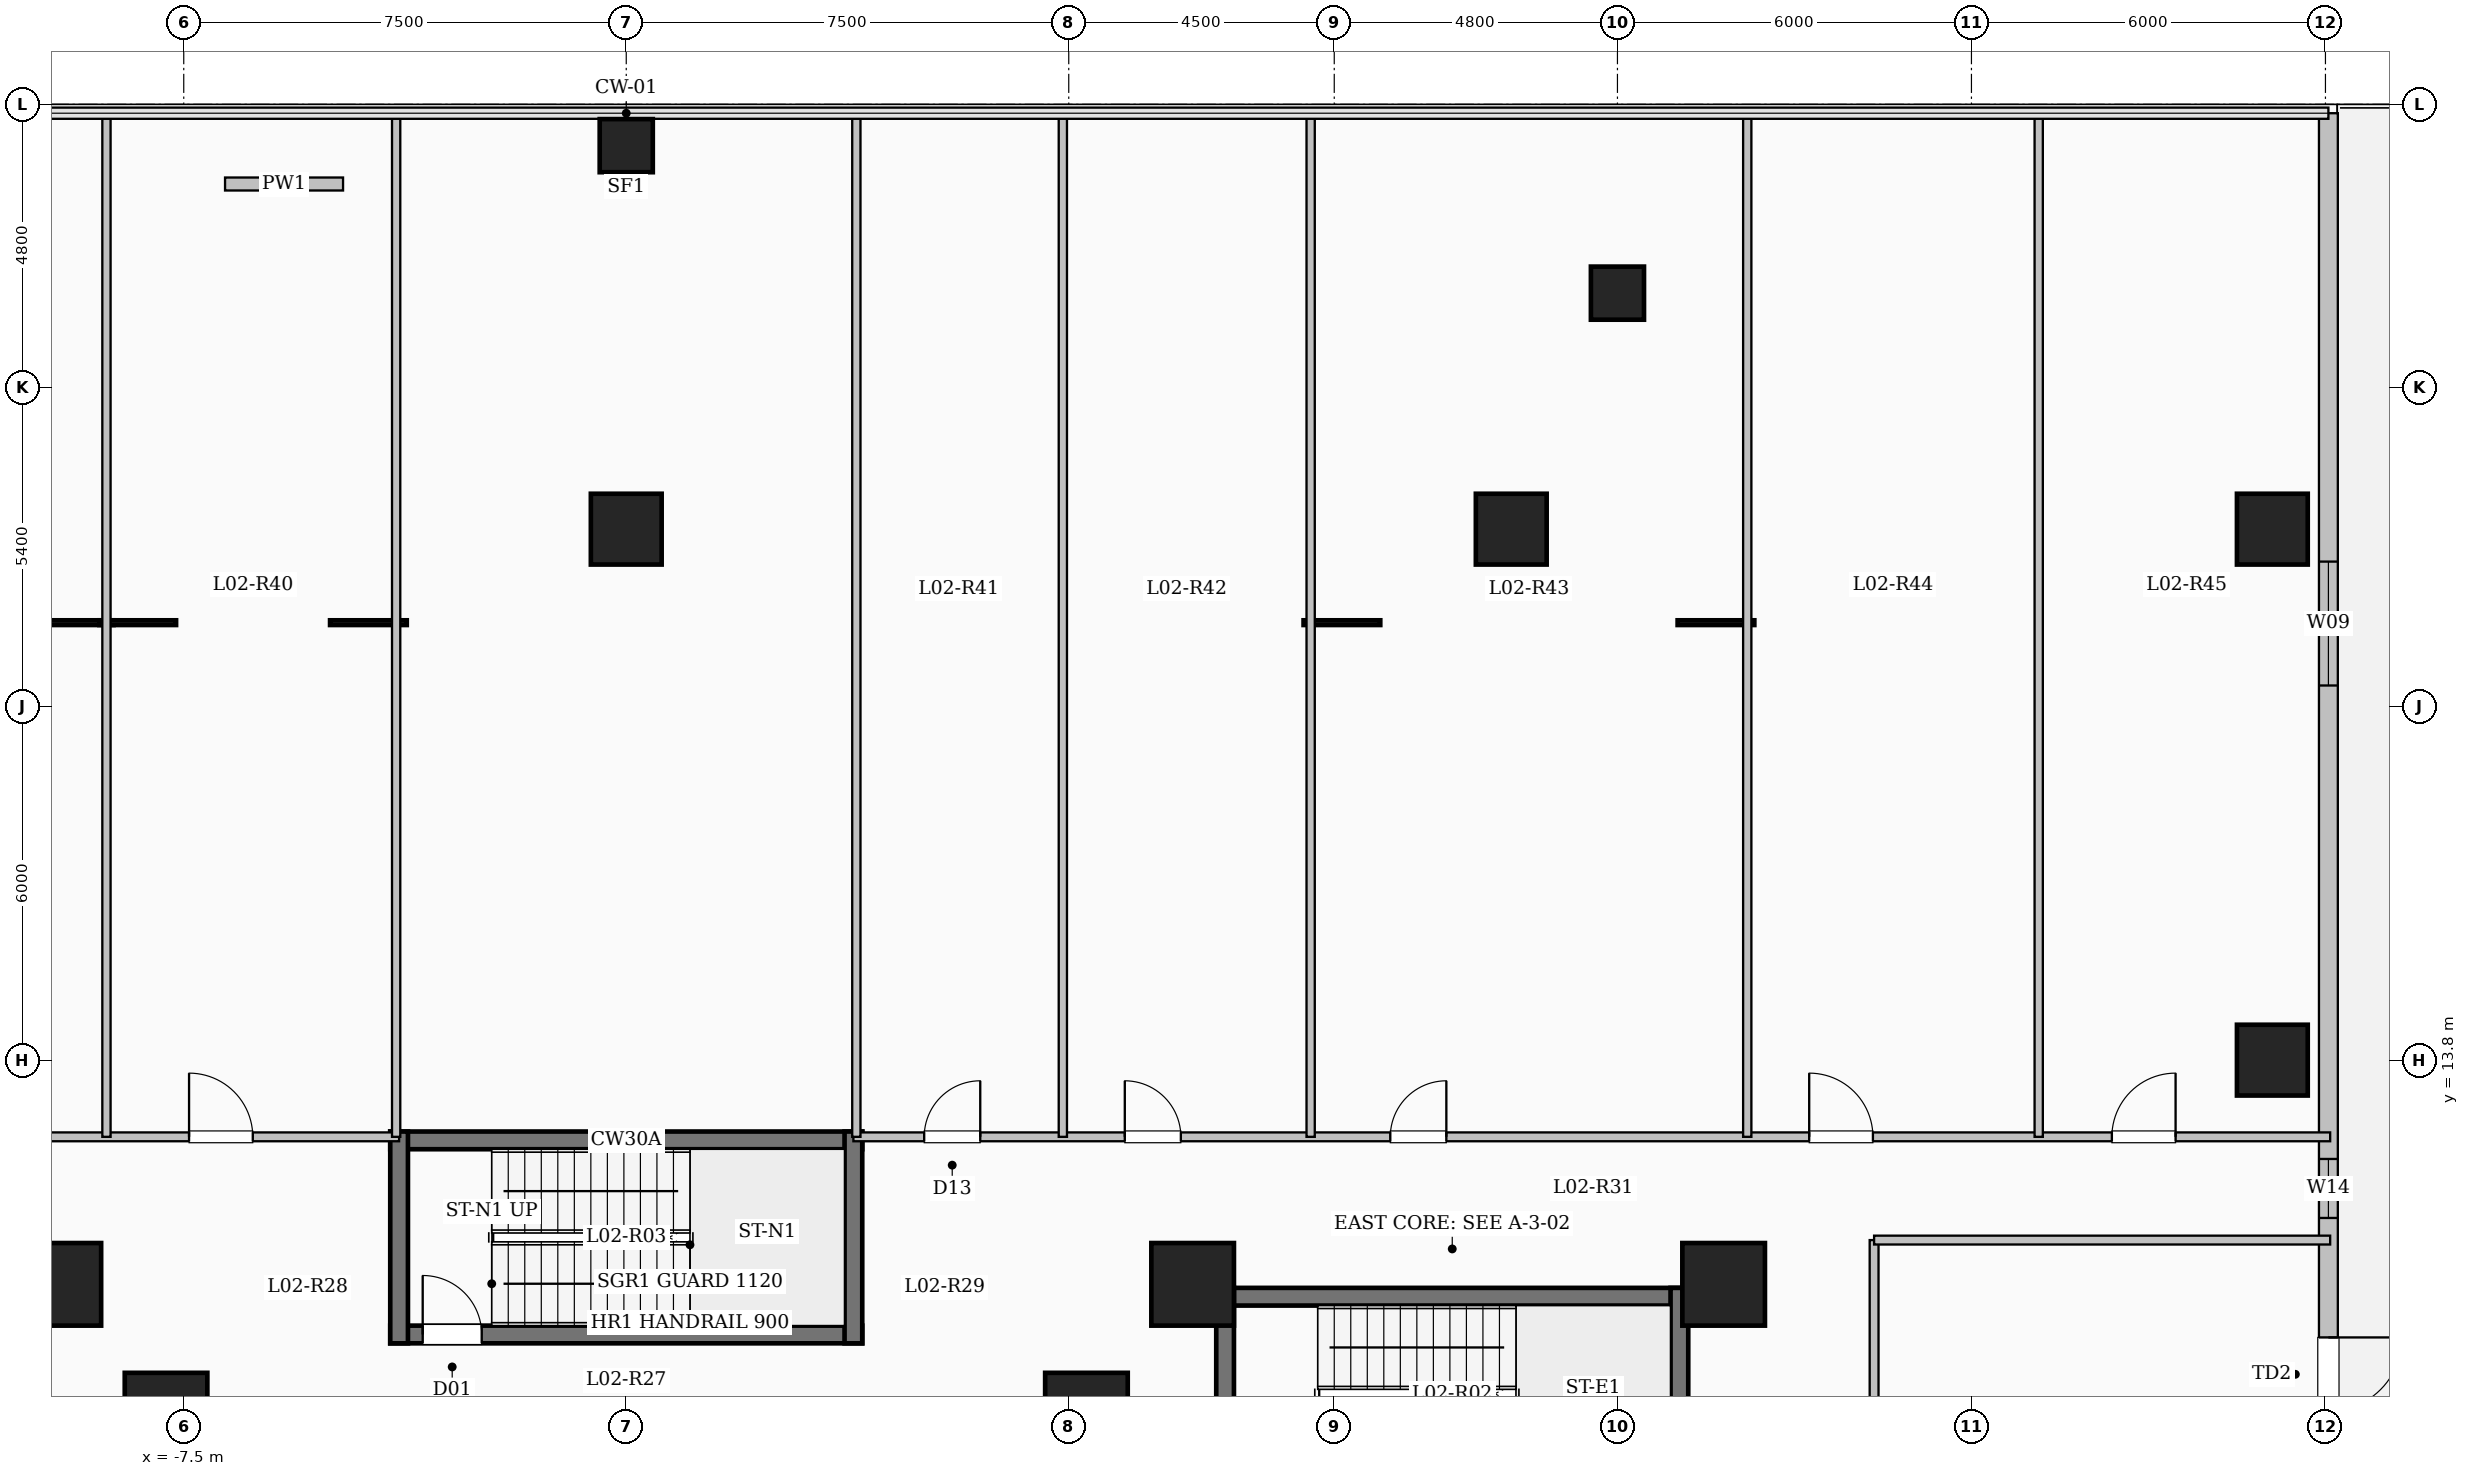
"""IFC4 building model, lengths in metres.
Left out: names, types, materials, properties, quantities, classifications, styles, units other than length and angle.
Written with IfcOpenShell. Run it as: python <this file> out.ifc"""

import sys

from ifc_helpers import new_model, si_unit, direction, frame, frame_2d, origin, origin_2d, place, context, subcontext, project, spatial, rectangle, extrude, element, fill, save


model = new_model("IFC4")
c1 = context("Model", 3, precision=1e-05, world=origin(), true_north=direction((0.0, 1.0)))
c2 = subcontext(c1, "Body", "Model", "MODEL_VIEW")
j1 = project(units=[si_unit("LENGTHUNIT", "METRE"), si_unit("PLANEANGLEUNIT", "RADIAN")], contexts=[c1])
p1 = place(None, origin())
s1 = spatial("IfcSite", under=j1, at=p1, CompositionType="ELEMENT")
p2 = place(p1, origin())
s2 = spatial("IfcBuilding", under=s1, at=p2, CompositionType="ELEMENT")
p3 = place(p2, frame((0.0, 0.0, 9.9)))
s3 = spatial("IfcBuildingStorey", under=s2, at=p3, CompositionType="ELEMENT", Elevation=9.9)
for number, where, z_axis, x_axis in (
    (1, (-7.8, 7.8, 0.0), (0.0, 0.0, 1.0), (1.0, 0.0, 0.0)),
    (2, (7.8, 7.8, 0.0), (0.0, 0.0, 1.0), (1.0, 0.0, 0.0)),
    (3, (-9.6, 10.0, 0.0), (0.0, 0.0, 1.0), (1.0, 0.0, 0.0)),
    (4, (9.6, 10.0, 0.0), (0.0, 0.0, 1.0), (1.0, 0.0, 0.0)),
    (5, (18.6, 10.0, 0.0), (0.0, 0.0, 1.0), (1.0, 0.0, 0.0)),
):
    element("IfcColumn", number, at=place(p3, frame(where, z_axis=z_axis, x_axis=x_axis)), inside=s3, PredefinedType="COLUMN", context=c2, shape_type="SweptSolid", body=[
        extrude(rectangle(XDim=1.4, YDim=1.4, at=origin_2d()), origin(), (0.0, 0.0, 1.0), 4.5),
    ])
for number, where, z_axis, x_axis in (
    (6, (0.0, 29.3, 0.0), (0.0, 0.0, 1.0), (1.0, 0.0, 0.0)),
    (7, (16.8, 26.8, 0.0), (0.0, 0.0, 1.0), (1.0, 0.0, 0.0)),
):
    element("IfcColumn", number, at=place(p3, frame(where, z_axis=z_axis, x_axis=x_axis)), inside=s3, PredefinedType="COLUMN", context=c2, shape_type="SweptSolid", body=[
        extrude(rectangle(XDim=0.9, YDim=0.9, at=origin_2d()), origin(), (0.0, 0.0, 1.0), 4.5),
    ])
for number, where, z_axis, x_axis in (
    (8, (0.0, 22.8, 0.0), (0.0, 0.0, 1.0), (1.0, 0.0, 0.0)),
    (9, (15.0, 22.8, 0.0), (0.0, 0.0, 1.0), (1.0, 0.0, 0.0)),
    (10, (27.9, 22.8, 0.0), (0.0, 0.0, 1.0), (1.0, 0.0, 0.0)),
    (11, (27.9, 13.8, 0.0), (0.0, 0.0, 1.0), (1.0, 0.0, 0.0)),
):
    element("IfcColumn", number, at=place(p3, frame(where, z_axis=z_axis, x_axis=x_axis)), inside=s3, PredefinedType="COLUMN", context=c2, shape_type="SweptSolid", body=[
        extrude(rectangle(XDim=1.2, YDim=1.2, at=origin_2d()), origin(), (0.0, 0.0, 1.0), 4.5),
    ])
p4 = place(p3, frame((28.85, 29.85, 0.0), z_axis=(0.0, 0.0, 1.0), x_axis=(0.0, -1.0, 0.0)))
e12 = element("IfcWall", 12, at=p4, inside=s3, PredefinedType="SOLIDWALL", context=c2, shape_type="SweptSolid", body=[
    extrude(rectangle(XDim=59.7, YDim=0.32, at=frame_2d((29.85, 0.0))), origin(), (0.0, 0.0, 1.0), 4.2),
])
p5 = place(p4, frame((20.75, 0.0, 0.0)))
e13 = element("IfcOpeningElement", 13, at=p5, cuts=e12, PredefinedType="OPENING", context=c2, shape_type="SweptSolid", body=[
    extrude(rectangle(XDim=1.25, YDim=2.25, at=frame_2d((0.625, 1.125))), frame((0.0, 0.17, 0.0), z_axis=(0.0, -1.0, 0.0), x_axis=(1.0, 0.0, 0.0)), (0.0, 0.0, 1.0), 0.34),
])
p6 = place(p4, frame((7.6, 0.0, 0.9)))
e14 = element("IfcOpeningElement", 14, at=p6, cuts=e12, PredefinedType="OPENING", context=c2, shape_type="SweptSolid", body=[
    extrude(rectangle(XDim=2.1, YDim=2.0, at=frame_2d((1.05, 1.0))), frame((0.0, 0.17, 0.0), z_axis=(0.0, -1.0, 0.0), x_axis=(1.0, 0.0, 0.0)), (0.0, 0.0, 1.0), 0.34),
])
p7 = place(p4, frame((17.725, 0.0, 0.95)))
e15 = element("IfcOpeningElement", 15, at=p7, cuts=e12, PredefinedType="OPENING", context=c2, shape_type="SweptSolid", body=[
    extrude(rectangle(XDim=1.0, YDim=1.5, at=frame_2d((0.5, 0.75))), frame((0.0, 0.17, 0.0), z_axis=(0.0, -1.0, 0.0), x_axis=(1.0, 0.0, 0.0)), (0.0, 0.0, 1.0), 0.34),
])
p8 = place(p4, frame((28.345, 0.0, 0.9)))
e16 = element("IfcOpeningElement", 16, at=p8, cuts=e12, PredefinedType="OPENING", context=c2, shape_type="SweptSolid", body=[
    extrude(rectangle(XDim=2.1, YDim=2.0, at=frame_2d((1.05, 1.0))), frame((0.0, 0.17, 0.0), z_axis=(0.0, -1.0, 0.0), x_axis=(1.0, 0.0, 0.0)), (0.0, 0.0, 1.0), 0.34),
])
p9 = place(p4, frame((37.758, 0.0, 0.9)))
e17 = element("IfcOpeningElement", 17, at=p9, cuts=e12, PredefinedType="OPENING", context=c2, shape_type="SweptSolid", body=[
    extrude(rectangle(XDim=1.7, YDim=1.9, at=frame_2d((0.85, 0.95))), frame((0.0, 0.17, 0.0), z_axis=(0.0, -1.0, 0.0), x_axis=(1.0, 0.0, 0.0)), (0.0, 0.0, 1.0), 0.34),
])
p10 = place(p3, frame((-6.8, 28.65, 0.0), z_axis=(0.0, 0.0, 1.0), x_axis=(1.0, 0.0, 0.0)))
e18 = element("IfcWall", 18, at=p10, inside=s3, PredefinedType="PARAPET", context=c2, shape_type="SweptSolid", body=[
    extrude(rectangle(XDim=2.0, YDim=0.22, at=frame_2d((1.0, 0.0))), origin(), (0.0, 0.0, 1.0), 0.85),
])
p11 = place(p3, frame((10.0, 9.79, 0.0), z_axis=(0.0, 0.0, 1.0), x_axis=(1.0, 0.0, 0.0)))
e19 = element("IfcWall", 19, at=p11, inside=s3, PredefinedType="SHEAR", context=c2, shape_type="SweptSolid", body=[
    extrude(rectangle(XDim=8.0, YDim=0.3, at=frame_2d((4.0, 0.0))), origin(), (0.0, 0.0, 1.0), 4.5),
])
for number, where, z_axis, x_axis in (
    (20, (10.15, 6.35, 0.0), (0.0, 0.0, 1.0), (0.0, 1.0, 0.0)),
    (21, (17.85, 6.35, 0.0), (0.0, 0.0, 1.0), (0.0, 1.0, 0.0)),
):
    element("IfcWall", number, at=place(p3, frame(where, z_axis=z_axis, x_axis=x_axis)), inside=s3, PredefinedType="SHEAR", context=c2, shape_type="SweptSolid", body=[
        extrude(rectangle(XDim=3.59, YDim=0.3, at=frame_2d((1.795, 0.0))), origin(), (0.0, 0.0, 1.0), 4.5),
    ])
p12 = place(p3, frame((-4.0, 12.44, 0.0), z_axis=(0.0, 0.0, 1.0), x_axis=(1.0, 0.0, 0.0)))
e22 = element("IfcWall", 22, at=p12, inside=s3, PredefinedType="SHEAR", context=c2, shape_type="SweptSolid", body=[
    extrude(rectangle(XDim=8.0, YDim=0.3, at=frame_2d((4.0, 0.0))), origin(), (0.0, 0.0, 1.0), 4.5),
])
p13 = place(p3, frame((-4.0, 9.15, 0.0), z_axis=(0.0, 0.0, 1.0), x_axis=(1.0, 0.0, 0.0)))
e23 = element("IfcWall", 23, at=p13, inside=s3, PredefinedType="SHEAR", context=c2, shape_type="SweptSolid", body=[
    extrude(rectangle(XDim=8.0, YDim=0.3, at=frame_2d((4.0, 0.0))), origin(), (0.0, 0.0, 1.0), 4.5),
])
p14 = place(p13, frame((0.55, 0.0, 0.0)))
e24 = element("IfcOpeningElement", 24, at=p14, cuts=e23, PredefinedType="OPENING", context=c2, shape_type="SweptSolid", body=[
    extrude(rectangle(XDim=1.0, YDim=2.15, at=frame_2d((0.5, 1.075))), frame((0.0, 0.16, 0.0), z_axis=(0.0, -1.0, 0.0), x_axis=(1.0, 0.0, 0.0)), (0.0, 0.0, 1.0), 0.32),
])
for number, where, z_axis, x_axis in (
    (25, (-3.85, 9.0, 0.0), (0.0, 0.0, 1.0), (0.0, 1.0, 0.0)),
    (26, (3.85, 9.0, 0.0), (0.0, 0.0, 1.0), (0.0, 1.0, 0.0)),
):
    element("IfcWall", number, at=place(p3, frame(where, z_axis=z_axis, x_axis=x_axis)), inside=s3, PredefinedType="SHEAR", context=c2, shape_type="SweptSolid", body=[
        extrude(rectangle(XDim=3.59, YDim=0.3, at=frame_2d((1.795, 0.0))), origin(), (0.0, 0.0, 1.0), 4.5),
    ])
p15 = place(p3, frame((-28.88, 12.5, 0.0), z_axis=(0.0, 0.0, 1.0), x_axis=(1.0, 0.0, 0.0)))
e27 = element("IfcWall", 27, at=p15, inside=s3, PredefinedType="PARTITIONING", context=c2, shape_type="SweptSolid", body=[
    extrude(rectangle(XDim=25.03, YDim=0.15, at=frame_2d((12.515, 0.0))), origin(), (0.0, 0.0, 1.0), 4.2),
])
p16 = place(p15, frame((2.5, 0.0, 0.0)))
e28 = element("IfcOpeningElement", 28, at=p16, cuts=e27, PredefinedType="OPENING", context=c2, shape_type="SweptSolid", body=[
    extrude(rectangle(XDim=1.2, YDim=2.15, at=frame_2d((0.6, 1.075))), frame((0.0, 0.085, 0.0), z_axis=(0.0, -1.0, 0.0), x_axis=(1.0, 0.0, 0.0)), (0.0, 0.0, 1.0), 0.17),
])
p17 = place(p15, frame((16.58, 0.0, 0.0)))
e29 = element("IfcOpeningElement", 29, at=p17, cuts=e27, PredefinedType="OPENING", context=c2, shape_type="SweptSolid", body=[
    extrude(rectangle(XDim=1.08, YDim=2.15, at=frame_2d((0.54, 1.075))), frame((0.0, 0.085, 0.0), z_axis=(0.0, -1.0, 0.0), x_axis=(1.0, 0.0, 0.0)), (0.0, 0.0, 1.0), 0.17),
])
p18 = place(p15, frame((21.47, 0.0, 0.0)))
e30 = element("IfcOpeningElement", 30, at=p18, cuts=e27, PredefinedType="OPENING", context=c2, shape_type="SweptSolid", body=[
    extrude(rectangle(XDim=1.08, YDim=2.15, at=frame_2d((0.54, 1.075))), frame((0.0, 0.085, 0.0), z_axis=(0.0, -1.0, 0.0), x_axis=(1.0, 0.0, 0.0)), (0.0, 0.0, 1.0), 0.17),
])
p19 = place(p3, frame((3.85, 12.5, 0.0), z_axis=(0.0, 0.0, 1.0), x_axis=(1.0, 0.0, 0.0)))
e31 = element("IfcWall", 31, at=p19, inside=s3, PredefinedType="PARTITIONING", context=c2, shape_type="SweptSolid", body=[
    extrude(rectangle(XDim=25.03, YDim=0.15, at=frame_2d((12.515, 0.0))), origin(), (0.0, 0.0, 1.0), 4.2),
])
p20 = place(p19, frame((1.2, 0.0, 0.0)))
e32 = element("IfcOpeningElement", 32, at=p20, cuts=e31, PredefinedType="OPENING", context=c2, shape_type="SweptSolid", body=[
    extrude(rectangle(XDim=0.95, YDim=2.15, at=frame_2d((0.475, 1.075))), frame((0.0, 0.085, 0.0), z_axis=(0.0, -1.0, 0.0), x_axis=(1.0, 0.0, 0.0)), (0.0, 0.0, 1.0), 0.17),
])
p21 = place(p19, frame((4.6, 0.0, 0.0)))
e33 = element("IfcOpeningElement", 33, at=p21, cuts=e31, PredefinedType="OPENING", context=c2, shape_type="SweptSolid", body=[
    extrude(rectangle(XDim=0.95, YDim=2.15, at=frame_2d((0.475, 1.075))), frame((0.0, 0.085, 0.0), z_axis=(0.0, -1.0, 0.0), x_axis=(1.0, 0.0, 0.0)), (0.0, 0.0, 1.0), 0.17),
])
p22 = place(p19, frame((9.1, 0.0, 0.0)))
e34 = element("IfcOpeningElement", 34, at=p22, cuts=e31, PredefinedType="OPENING", context=c2, shape_type="SweptSolid", body=[
    extrude(rectangle(XDim=0.95, YDim=2.15, at=frame_2d((0.475, 1.075))), frame((0.0, 0.085, 0.0), z_axis=(0.0, -1.0, 0.0), x_axis=(1.0, 0.0, 0.0)), (0.0, 0.0, 1.0), 0.17),
])
p23 = place(p19, frame((16.2, 0.0, 0.0)))
e35 = element("IfcOpeningElement", 35, at=p23, cuts=e31, PredefinedType="OPENING", context=c2, shape_type="SweptSolid", body=[
    extrude(rectangle(XDim=1.08, YDim=2.15, at=frame_2d((0.54, 1.075))), frame((0.0, 0.085, 0.0), z_axis=(0.0, -1.0, 0.0), x_axis=(1.0, 0.0, 0.0)), (0.0, 0.0, 1.0), 0.17),
])
p24 = place(p19, frame((21.33, 0.0, 0.0)))
e36 = element("IfcOpeningElement", 36, at=p24, cuts=e31, PredefinedType="OPENING", context=c2, shape_type="SweptSolid", body=[
    extrude(rectangle(XDim=1.08, YDim=2.15, at=frame_2d((0.54, 1.075))), frame((0.0, 0.085, 0.0), z_axis=(0.0, -1.0, 0.0), x_axis=(1.0, 0.0, 0.0)), (0.0, 0.0, 1.0), 0.17),
])
p25 = place(p3, frame((21.15, -7.25, 0.0), z_axis=(0.0, 0.0, 1.0), x_axis=(0.0, 1.0, 0.0)))
e37 = element("IfcWall", 37, at=p25, inside=s3, PredefinedType="PARTITIONING", context=c2, shape_type="SweptSolid", body=[
    extrude(rectangle(XDim=18.0, YDim=0.15, at=frame_2d((9.0, 0.0))), origin(), (0.0, 0.0, 1.0), 4.2),
])
for number, where, z_axis, x_axis in (
    (38, (-3.9, 12.5, 0.0), (0.0, 0.0, 1.0), (0.0, 1.0, 0.0)),
    (39, (3.9, 12.5, 0.0), (0.0, 0.0, 1.0), (0.0, 1.0, 0.0)),
    (40, (-8.81, 12.5, 0.0), (0.0, 0.0, 1.0), (0.0, 1.0, 0.0)),
    (41, (7.4, 12.5, 0.0), (0.0, 0.0, 1.0), (0.0, 1.0, 0.0)),
    (42, (11.6, 12.5, 0.0), (0.0, 0.0, 1.0), (0.0, 1.0, 0.0)),
    (43, (19.0, 12.5, 0.0), (0.0, 0.0, 1.0), (0.0, 1.0, 0.0)),
    (44, (23.94, 12.5, 0.0), (0.0, 0.0, 1.0), (0.0, 1.0, 0.0)),
):
    element("IfcWall", number, at=place(p3, frame(where, z_axis=z_axis, x_axis=x_axis)), inside=s3, PredefinedType="PARTITIONING", context=c2, shape_type="SweptSolid", body=[
        extrude(rectangle(XDim=17.38, YDim=0.14, at=frame_2d((8.69, 0.0))), origin(), (0.0, 0.0, 1.0), 4.2),
    ])
p26 = place(p3, frame((21.15, 10.75, 0.0), z_axis=(0.0, 0.0, 1.0), x_axis=(1.0, 0.0, 0.0)))
e45 = element("IfcWall", 45, at=p26, inside=s3, PredefinedType="PARTITIONING", context=c2, shape_type="SweptSolid", body=[
    extrude(rectangle(XDim=7.73, YDim=0.15, at=frame_2d((3.865, 0.0))), origin(), (0.0, 0.0, 1.0), 4.2),
])
p27 = place(p5, origin())
e46 = element("IfcDoor", 46, at=p27, inside=s3, OperationType="SINGLE_SWING_LEFT", PredefinedType="DOOR", context=c2, shape_type="SweptSolid", body=[
    extrude(rectangle(XDim=1.25, YDim=2.25, at=frame_2d((0.625, 1.125))), frame((0.0, 0.025, 0.0), z_axis=(0.0, -1.0, 0.0), x_axis=(1.0, 0.0, 0.0)), (0.0, 0.0, 1.0), 0.05),
])
fill(e13, e46)
p28 = place(p6, origin())
e47 = element("IfcWindow", 47, at=p28, inside=s3, PartitioningType="SINGLE_PANEL", PredefinedType="WINDOW", context=c2, shape_type="SweptSolid", body=[
    extrude(rectangle(XDim=2.1, YDim=2.0, at=frame_2d((1.05, 1.0))), frame((0.0, 0.03, 0.0), z_axis=(0.0, -1.0, 0.0), x_axis=(1.0, 0.0, 0.0)), (0.0, 0.0, 1.0), 0.06),
])
fill(e14, e47)
p29 = place(p7, origin())
e48 = element("IfcWindow", 48, at=p29, inside=s3, PartitioningType="SINGLE_PANEL", PredefinedType="WINDOW", context=c2, shape_type="SweptSolid", body=[
    extrude(rectangle(XDim=1.0, YDim=1.5, at=frame_2d((0.5, 0.75))), frame((0.0, 0.03, 0.0), z_axis=(0.0, -1.0, 0.0), x_axis=(1.0, 0.0, 0.0)), (0.0, 0.0, 1.0), 0.06),
])
fill(e15, e48)
p30 = place(p14, origin())
e49 = element("IfcDoor", 49, at=p30, inside=s3, OperationType="SINGLE_SWING_LEFT", PredefinedType="DOOR", context=c2, shape_type="SweptSolid", body=[
    extrude(rectangle(XDim=1.0, YDim=2.15, at=frame_2d((0.5, 1.075))), frame((0.0, 0.025, 0.0), z_axis=(0.0, -1.0, 0.0), x_axis=(1.0, 0.0, 0.0)), (0.0, 0.0, 1.0), 0.05),
])
fill(e24, e49)
p31 = place(p18, origin())
e50 = element("IfcDoor", 50, at=p31, inside=s3, OperationType="SINGLE_SWING_LEFT", PredefinedType="DOOR", context=c2, shape_type="SweptSolid", body=[
    extrude(rectangle(XDim=1.08, YDim=2.15, at=frame_2d((0.54, 1.075))), frame((0.0, 0.025, 0.0), z_axis=(0.0, -1.0, 0.0), x_axis=(1.0, 0.0, 0.0)), (0.0, 0.0, 1.0), 0.05),
])
fill(e30, e50)
p32 = place(p20, origin())
e51 = element("IfcDoor", 51, at=p32, inside=s3, OperationType="SINGLE_SWING_RIGHT", PredefinedType="DOOR", context=c2, shape_type="SweptSolid", body=[
    extrude(rectangle(XDim=0.95, YDim=2.15, at=frame_2d((0.475, 1.075))), frame((0.0, 0.025, 0.0), z_axis=(0.0, -1.0, 0.0), x_axis=(1.0, 0.0, 0.0)), (0.0, 0.0, 1.0), 0.05),
])
fill(e32, e51)
p33 = place(p21, origin())
e52 = element("IfcDoor", 52, at=p33, inside=s3, OperationType="SINGLE_SWING_LEFT", PredefinedType="DOOR", context=c2, shape_type="SweptSolid", body=[
    extrude(rectangle(XDim=0.95, YDim=2.15, at=frame_2d((0.475, 1.075))), frame((0.0, 0.025, 0.0), z_axis=(0.0, -1.0, 0.0), x_axis=(1.0, 0.0, 0.0)), (0.0, 0.0, 1.0), 0.05),
])
fill(e33, e52)
p34 = place(p22, origin())
e53 = element("IfcDoor", 53, at=p34, inside=s3, OperationType="SINGLE_SWING_RIGHT", PredefinedType="DOOR", context=c2, shape_type="SweptSolid", body=[
    extrude(rectangle(XDim=0.95, YDim=2.15, at=frame_2d((0.475, 1.075))), frame((0.0, 0.025, 0.0), z_axis=(0.0, -1.0, 0.0), x_axis=(1.0, 0.0, 0.0)), (0.0, 0.0, 1.0), 0.05),
])
fill(e34, e53)
p35 = place(p23, origin())
e54 = element("IfcDoor", 54, at=p35, inside=s3, OperationType="SINGLE_SWING_LEFT", PredefinedType="DOOR", context=c2, shape_type="SweptSolid", body=[
    extrude(rectangle(XDim=1.08, YDim=2.15, at=frame_2d((0.54, 1.075))), frame((0.0, 0.025, 0.0), z_axis=(0.0, -1.0, 0.0), x_axis=(1.0, 0.0, 0.0)), (0.0, 0.0, 1.0), 0.05),
])
fill(e35, e54)
p36 = place(p24, origin())
e55 = element("IfcDoor", 55, at=p36, inside=s3, OperationType="SINGLE_SWING_RIGHT", PredefinedType="DOOR", context=c2, shape_type="SweptSolid", body=[
    extrude(rectangle(XDim=1.08, YDim=2.15, at=frame_2d((0.54, 1.075))), frame((0.0, 0.025, 0.0), z_axis=(0.0, -1.0, 0.0), x_axis=(1.0, 0.0, 0.0)), (0.0, 0.0, 1.0), 0.05),
])
fill(e36, e55)
save(model, sys.argv[1])
